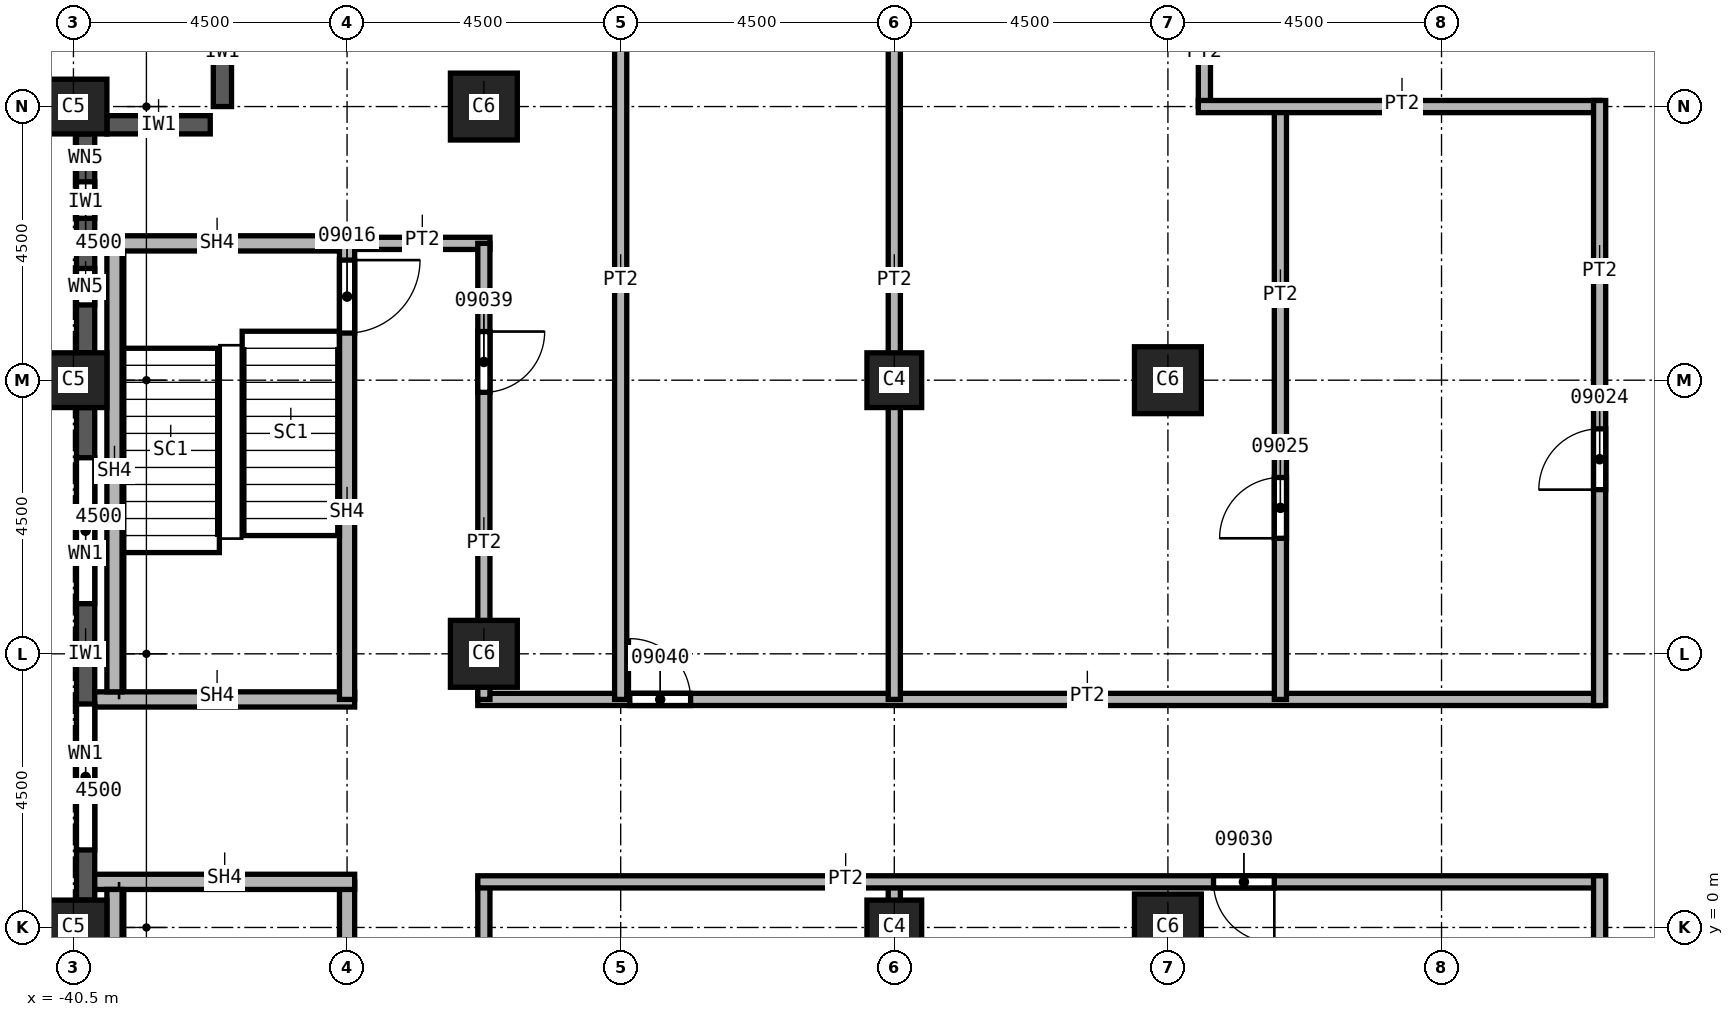
"""IFC4 building model, lengths in metres.
Left out: names, types, materials, properties, quantities, classifications, styles, units other than length and angle.
Written with IfcOpenShell. Run it as: python <this file> out.ifc"""

import sys

from ifc_helpers import new_model, si_unit, direction, frame, frame_2d, origin, origin_2d, place, context, subcontext, project, spatial, rectangle, extrude, element, fill, save


model = new_model("IFC4")
c1 = context("Model", 3, precision=1e-05, world=origin(), true_north=direction((0.0, 1.0)))
c2 = subcontext(c1, "Body", "Model", "MODEL_VIEW")
j1 = project(units=[si_unit("LENGTHUNIT", "METRE"), si_unit("PLANEANGLEUNIT", "RADIAN")], contexts=[c1])
p1 = place(None, origin())
s1 = spatial("IfcSite", under=j1, at=p1, CompositionType="ELEMENT")
p2 = place(p1, origin())
s2 = spatial("IfcBuilding", under=s1, at=p2, CompositionType="ELEMENT")
p3 = place(p2, frame((0.0, 0.0, 162.0)))
s3 = spatial("IfcBuildingStorey", under=s2, at=p3, CompositionType="ELEMENT", Elevation=162.0)
for number, where, z_axis, x_axis in (
    (1, (-40.5, 0.0, 0.0), (0.0, 0.0, 1.0), (0.0, 1.0, 0.0)),
    (2, (-40.5, 9.0, 0.0), (0.0, 0.0, 1.0), (0.0, 1.0, 0.0)),
    (3, (-40.5, 13.5, 0.0), (0.0, 0.0, 1.0), (0.0, 1.0, 0.0)),
):
    element("IfcColumn", number, at=place(p3, frame(where, z_axis=z_axis, x_axis=x_axis)), inside=s3, PredefinedType="COLUMN", context=c2, shape_type="SweptSolid", body=[
        extrude(rectangle(XDim=0.9, YDim=1.1, at=origin_2d()), origin(), (0.0, 0.0, 1.0), 3.7),
    ])
for number, where, z_axis, x_axis in (
    (4, (-33.75, 4.5, 0.0), (0.0, 0.0, 1.0), (1.0, 0.0, 0.0)),
    (5, (-33.75, 13.5, 0.0), (0.0, 0.0, 1.0), (1.0, 0.0, 0.0)),
    (6, (-22.5, 0.0, 0.0), (0.0, 0.0, 1.0), (1.0, 0.0, 0.0)),
    (7, (-22.5, 9.0, 0.0), (0.0, 0.0, 1.0), (1.0, 0.0, 0.0)),
):
    element("IfcColumn", number, at=place(p3, frame(where, z_axis=z_axis, x_axis=x_axis)), inside=s3, PredefinedType="COLUMN", context=c2, shape_type="SweptSolid", body=[
        extrude(rectangle(XDim=1.1, YDim=1.1, at=origin_2d()), origin(), (0.0, 0.0, 1.0), 3.7),
    ])
for number, where, z_axis, x_axis in (
    (8, (-27.0, 0.0, 0.0), (0.0, 0.0, 1.0), (1.0, 0.0, 0.0)),
    (9, (-27.0, 9.0, 0.0), (0.0, 0.0, 1.0), (1.0, 0.0, 0.0)),
):
    element("IfcColumn", number, at=place(p3, frame(where, z_axis=z_axis, x_axis=x_axis)), inside=s3, PredefinedType="COLUMN", context=c2, shape_type="SweptSolid", body=[
        extrude(rectangle(XDim=0.9, YDim=0.9, at=origin_2d()), origin(), (0.0, 0.0, 1.0), 3.7),
    ])
p4 = place(p3, frame((-38.05, 15.3, 0.0), z_axis=(0.0, 0.0, 1.0), x_axis=(0.0, -1.0, 0.0)))
e10 = element("IfcWall", 10, at=p4, inside=s3, PredefinedType="SOLIDWALL", context=c2, shape_type="SweptSolid", body=[
    extrude(rectangle(XDim=1.8, YDim=0.3, at=frame_2d((0.9, 0.0))), origin(), (0.0, 0.0, 1.0), 3.1),
])
p5 = place(p3, frame((-39.95, 13.2, 0.0), z_axis=(0.0, 0.0, 1.0), x_axis=(1.0, 0.0, 0.0)))
e11 = element("IfcWall", 11, at=p5, inside=s3, PredefinedType="SOLIDWALL", context=c2, shape_type="SweptSolid", body=[
    extrude(rectangle(XDim=1.7, YDim=0.3, at=frame_2d((0.85, 0.0))), origin(), (0.0, 0.0, 1.0), 3.1),
])
p6 = place(p3, frame((-40.3, 13.05, 0.0), z_axis=(0.0, 0.0, 1.0), x_axis=(0.0, -1.0, 0.0)))
e12 = element("IfcWall", 12, at=p6, inside=s3, PredefinedType="SOLIDWALL", context=c2, shape_type="SweptSolid", body=[
    extrude(rectangle(XDim=3.6, YDim=0.3, at=frame_2d((1.8, 0.0))), origin(), (0.0, 0.0, 1.0), 3.1),
])
p7 = place(p6, frame((0.788, 0.0, 0.8)))
e13 = element("IfcOpeningElement", 13, at=p7, cuts=e12, PredefinedType="OPENING", context=c2, shape_type="SweptSolid", body=[
    extrude(rectangle(XDim=0.6, YDim=1.95, at=frame_2d((0.3, 0.975))), frame((0.0, 0.15, 0.0), z_axis=(0.0, -1.0, 0.0), x_axis=(1.0, 0.0, 0.0)), (0.0, 0.0, 1.0), 0.3),
])
p8 = place(p6, frame((2.212, 0.0, 0.8)))
e14 = element("IfcOpeningElement", 14, at=p8, cuts=e12, PredefinedType="OPENING", context=c2, shape_type="SweptSolid", body=[
    extrude(rectangle(XDim=0.6, YDim=1.95, at=frame_2d((0.3, 0.975))), frame((0.0, 0.15, 0.0), z_axis=(0.0, -1.0, 0.0), x_axis=(1.0, 0.0, 0.0)), (0.0, 0.0, 1.0), 0.3),
])
p9 = place(p3, frame((-40.3, 8.55, 0.0), z_axis=(0.0, 0.0, 1.0), x_axis=(0.0, -1.0, 0.0)))
e15 = element("IfcWall", 15, at=p9, inside=s3, PredefinedType="SOLIDWALL", context=c2, shape_type="SweptSolid", body=[
    extrude(rectangle(XDim=8.1, YDim=0.3, at=frame_2d((4.05, 0.0))), origin(), (0.0, 0.0, 1.0), 3.1),
])
p10 = place(p9, frame((0.825, 0.0, 0.8)))
e16 = element("IfcOpeningElement", 16, at=p10, cuts=e15, PredefinedType="OPENING", context=c2, shape_type="SweptSolid", body=[
    extrude(rectangle(XDim=2.4, YDim=1.95, at=frame_2d((1.2, 0.975))), frame((0.0, 0.15, 0.0), z_axis=(0.0, -1.0, 0.0), x_axis=(1.0, 0.0, 0.0)), (0.0, 0.0, 1.0), 0.3),
])
p11 = place(p9, frame((4.875, 0.0, 0.8)))
e17 = element("IfcOpeningElement", 17, at=p11, cuts=e15, PredefinedType="OPENING", context=c2, shape_type="SweptSolid", body=[
    extrude(rectangle(XDim=2.4, YDim=1.95, at=frame_2d((1.2, 0.975))), frame((0.0, 0.15, 0.0), z_axis=(0.0, -1.0, 0.0), x_axis=(1.0, 0.0, 0.0)), (0.0, 0.0, 1.0), 0.3),
])
p12 = place(p3, frame((-36.0, 11.25, 0.0), z_axis=(0.0, 0.0, 1.0), x_axis=(1.0, 0.0, 0.0)))
e18 = element("IfcWall", 18, at=p12, inside=s3, PredefinedType="PARTITIONING", context=c2, shape_type="SweptSolid", body=[
    extrude(rectangle(XDim=2.35, YDim=0.2, at=frame_2d((1.175, 0.0))), origin(), (0.0, 0.0, 1.0), 3.7),
])
p13 = place(p3, frame((-33.85, 3.75, 0.0), z_axis=(0.0, 0.0, 1.0), x_axis=(1.0, 0.0, 0.0)))
e19 = element("IfcWall", 19, at=p13, inside=s3, PredefinedType="PARTITIONING", context=c2, shape_type="SweptSolid", body=[
    extrude(rectangle(XDim=18.45, YDim=0.2, at=frame_2d((9.225, 0.0))), origin(), (0.0, 0.0, 1.0), 3.7),
])
p14 = place(p13, frame((2.5, 0.0, 0.0)))
e20 = element("IfcOpeningElement", 20, at=p14, cuts=e19, PredefinedType="OPENING", context=c2, shape_type="SweptSolid", body=[
    extrude(rectangle(XDim=1.0, YDim=2.1, at=frame_2d((0.5, 1.05))), frame((0.0, 0.1, 0.0), z_axis=(0.0, -1.0, 0.0), x_axis=(1.0, 0.0, 0.0)), (0.0, 0.0, 1.0), 0.2),
])
p15 = place(p3, frame((-33.75, 0.75, 0.0), z_axis=(0.0, 0.0, 1.0), x_axis=(0.0, -1.0, 0.0)))
e21 = element("IfcWall", 21, at=p15, inside=s3, PredefinedType="PARTITIONING", context=c2, shape_type="SweptSolid", body=[
    extrude(rectangle(XDim=18.4, YDim=0.2, at=frame_2d((9.2, 0.0))), origin(), (0.0, 0.0, 1.0), 3.7),
])
p16 = place(p15, frame((6.1, 0.0, 0.0)))
e22 = element("IfcOpeningElement", 22, at=p16, cuts=e21, PredefinedType="OPENING", context=c2, shape_type="SweptSolid", body=[
    extrude(rectangle(XDim=1.0, YDim=2.1, at=frame_2d((0.5, 1.05))), frame((0.0, 0.1, 0.0), z_axis=(0.0, -1.0, 0.0), x_axis=(1.0, 0.0, 0.0)), (0.0, 0.0, 1.0), 0.2),
])
p17 = place(p3, frame((-33.75, 11.25, 0.0), z_axis=(0.0, 0.0, 1.0), x_axis=(0.0, -1.0, 0.0)))
e23 = element("IfcWall", 23, at=p17, inside=s3, PredefinedType="PARTITIONING", context=c2, shape_type="SweptSolid", body=[
    extrude(rectangle(XDim=7.5, YDim=0.2, at=frame_2d((3.75, 0.0))), origin(), (0.0, 0.0, 1.0), 3.7),
])
p18 = place(p17, frame((1.45, 0.0, 0.0)))
e24 = element("IfcOpeningElement", 24, at=p18, cuts=e23, PredefinedType="OPENING", context=c2, shape_type="SweptSolid", body=[
    extrude(rectangle(XDim=1.0, YDim=2.1, at=frame_2d((0.5, 1.05))), frame((0.0, 0.1, 0.0), z_axis=(0.0, -1.0, 0.0), x_axis=(1.0, 0.0, 0.0)), (0.0, 0.0, 1.0), 0.2),
])
p19 = place(p3, frame((-31.5, 17.45, 0.0), z_axis=(0.0, 0.0, 1.0), x_axis=(0.0, -1.0, 0.0)))
e25 = element("IfcWall", 25, at=p19, inside=s3, PredefinedType="PARTITIONING", context=c2, shape_type="SweptSolid", body=[
    extrude(rectangle(XDim=13.7, YDim=0.2, at=frame_2d((6.85, 0.0))), origin(), (0.0, 0.0, 1.0), 3.7),
])
p20 = place(p3, frame((-27.0, -17.45, 0.0), z_axis=(0.0, 0.0, 1.0), x_axis=(0.0, 1.0, 0.0)))
e26 = element("IfcWall", 26, at=p20, inside=s3, PredefinedType="PARTITIONING", context=c2, shape_type="SweptSolid", body=[
    extrude(rectangle(XDim=18.2, YDim=0.2, at=frame_2d((9.1, 0.0))), origin(), (0.0, 0.0, 1.0), 3.7),
])
p21 = place(p3, frame((-27.0, 3.75, 0.0), z_axis=(0.0, 0.0, 1.0), x_axis=(0.0, 1.0, 0.0)))
e27 = element("IfcWall", 27, at=p21, inside=s3, PredefinedType="PARTITIONING", context=c2, shape_type="SweptSolid", body=[
    extrude(rectangle(XDim=13.7, YDim=0.2, at=frame_2d((6.85, 0.0))), origin(), (0.0, 0.0, 1.0), 3.7),
])
p22 = place(p3, frame((-15.4, 0.75, 0.0), z_axis=(0.0, 0.0, 1.0), x_axis=(-1.0, 0.0, 0.0)))
e28 = element("IfcWall", 28, at=p22, inside=s3, PredefinedType="PARTITIONING", context=c2, shape_type="SweptSolid", body=[
    extrude(rectangle(XDim=18.45, YDim=0.2, at=frame_2d((9.225, 0.0))), origin(), (0.0, 0.0, 1.0), 3.7),
])
p23 = place(p22, frame((5.35, 0.0, 0.0)))
e29 = element("IfcOpeningElement", 29, at=p23, cuts=e28, PredefinedType="OPENING", context=c2, shape_type="SweptSolid", body=[
    extrude(rectangle(XDim=1.0, YDim=2.1, at=frame_2d((0.5, 1.05))), frame((0.0, 0.1, 0.0), z_axis=(0.0, -1.0, 0.0), x_axis=(1.0, 0.0, 0.0)), (0.0, 0.0, 1.0), 0.2),
])
p24 = place(p3, frame((-21.9, 13.5, 0.0), z_axis=(0.0, 0.0, 1.0), x_axis=(0.0, 1.0, 0.0)))
e30 = element("IfcWall", 30, at=p24, inside=s3, PredefinedType="PARTITIONING", context=c2, shape_type="SweptSolid", body=[
    extrude(rectangle(XDim=1.7, YDim=0.2, at=frame_2d((0.85, 0.0))), origin(), (0.0, 0.0, 1.0), 3.7),
])
p25 = place(p3, frame((-20.65, 3.75, 0.0), z_axis=(0.0, 0.0, 1.0), x_axis=(0.0, 1.0, 0.0)))
e31 = element("IfcWall", 31, at=p25, inside=s3, PredefinedType="PARTITIONING", context=c2, shape_type="SweptSolid", body=[
    extrude(rectangle(XDim=9.75, YDim=0.2, at=frame_2d((4.875, 0.0))), origin(), (0.0, 0.0, 1.0), 3.7),
])
p26 = place(p25, frame((2.65, 0.0, 0.0)))
e32 = element("IfcOpeningElement", 32, at=p26, cuts=e31, PredefinedType="OPENING", context=c2, shape_type="SweptSolid", body=[
    extrude(rectangle(XDim=1.0, YDim=2.1, at=frame_2d((0.5, 1.05))), frame((0.0, 0.1, 0.0), z_axis=(0.0, -1.0, 0.0), x_axis=(1.0, 0.0, 0.0)), (0.0, 0.0, 1.0), 0.2),
])
p27 = place(p3, frame((-15.4, 13.5, 0.0), z_axis=(0.0, 0.0, 1.0), x_axis=(-1.0, 0.0, 0.0)))
e33 = element("IfcWall", 33, at=p27, inside=s3, PredefinedType="PARTITIONING", context=c2, shape_type="SweptSolid", body=[
    extrude(rectangle(XDim=6.6, YDim=0.2, at=frame_2d((3.3, 0.0))), origin(), (0.0, 0.0, 1.0), 3.7),
])
p28 = place(p3, frame((-15.4, -23.25, 0.0), z_axis=(0.0, 0.0, 1.0), x_axis=(0.0, 1.0, 0.0)))
e34 = element("IfcWall", 34, at=p28, inside=s3, PredefinedType="PARTITIONING", context=c2, shape_type="SweptSolid", body=[
    extrude(rectangle(XDim=24.1, YDim=0.2, at=frame_2d((12.05, 0.0))), origin(), (0.0, 0.0, 1.0), 3.7),
])
p29 = place(p28, frame((0.25, 0.0, 0.0)))
e35 = element("IfcOpeningElement", 35, at=p29, cuts=e34, PredefinedType="OPENING", context=c2, shape_type="SweptSolid", body=[
    extrude(rectangle(XDim=1.0, YDim=2.1, at=frame_2d((0.5, 1.05))), frame((0.0, 0.1, 0.0), z_axis=(0.0, -1.0, 0.0), x_axis=(1.0, 0.0, 0.0)), (0.0, 0.0, 1.0), 0.2),
])
p30 = place(p28, frame((8.55, 0.0, 0.0)))
e36 = element("IfcOpeningElement", 36, at=p30, cuts=e34, PredefinedType="OPENING", context=c2, shape_type="SweptSolid", body=[
    extrude(rectangle(XDim=1.0, YDim=2.1, at=frame_2d((0.5, 1.05))), frame((0.0, 0.1, 0.0), z_axis=(0.0, -1.0, 0.0), x_axis=(1.0, 0.0, 0.0)), (0.0, 0.0, 1.0), 0.2),
])
p31 = place(p28, frame((14.4, 0.0, 0.0)))
e37 = element("IfcOpeningElement", 37, at=p31, cuts=e34, PredefinedType="OPENING", context=c2, shape_type="SweptSolid", body=[
    extrude(rectangle(XDim=1.0, YDim=2.1, at=frame_2d((0.5, 1.05))), frame((0.0, 0.1, 0.0), z_axis=(0.0, -1.0, 0.0), x_axis=(1.0, 0.0, 0.0)), (0.0, 0.0, 1.0), 0.2),
])
p32 = place(p3, frame((-15.4, 3.65, 0.0), z_axis=(0.0, 0.0, 1.0), x_axis=(0.0, 1.0, 0.0)))
e38 = element("IfcWall", 38, at=p32, inside=s3, PredefinedType="PARTITIONING", context=c2, shape_type="SweptSolid", body=[
    extrude(rectangle(XDim=9.95, YDim=0.2, at=frame_2d((4.975, 0.0))), origin(), (0.0, 0.0, 1.0), 3.7),
])
p33 = place(p32, frame((3.55, 0.0, 0.0)))
e39 = element("IfcOpeningElement", 39, at=p33, cuts=e38, PredefinedType="OPENING", context=c2, shape_type="SweptSolid", body=[
    extrude(rectangle(XDim=1.0, YDim=2.1, at=frame_2d((0.5, 1.05))), frame((0.0, 0.1, 0.0), z_axis=(0.0, -1.0, 0.0), x_axis=(1.0, 0.0, 0.0)), (0.0, 0.0, 1.0), 0.2),
])
p34 = place(p3, frame((-40.15, 3.75, 0.0), z_axis=(0.0, 0.0, 1.0), x_axis=(1.0, 0.0, 0.0)))
e40 = element("IfcWall", 40, at=p34, inside=s3, PredefinedType="SOLIDWALL", context=c2, shape_type="SweptSolid", body=[
    extrude(rectangle(XDim=4.275, YDim=0.25, at=frame_2d((2.137, 0.0))), origin(), (0.0, 0.0, 1.0), 3.7),
])
p35 = place(p3, frame((-40.15, 11.25, 0.0), z_axis=(0.0, 0.0, 1.0), x_axis=(1.0, 0.0, 0.0)))
e41 = element("IfcWall", 41, at=p35, inside=s3, PredefinedType="SOLIDWALL", context=c2, shape_type="SweptSolid", body=[
    extrude(rectangle(XDim=4.15, YDim=0.25, at=frame_2d((2.075, 0.0))), origin(), (0.0, 0.0, 1.0), 3.7),
])
p36 = place(p3, frame((-36.0, 0.75, 0.0), z_axis=(0.0, 0.0, 1.0), x_axis=(0.0, -1.0, 0.0)))
e42 = element("IfcWall", 42, at=p36, inside=s3, PredefinedType="SOLIDWALL", context=c2, shape_type="SweptSolid", body=[
    extrude(rectangle(XDim=7.625, YDim=0.25, at=frame_2d((3.812, 0.0))), origin(), (0.0, 0.0, 1.0), 3.7),
])
p37 = place(p36, frame((5.95, 0.0, 0.0)))
e43 = element("IfcOpeningElement", 43, at=p37, cuts=e42, PredefinedType="OPENING", context=c2, shape_type="SweptSolid", body=[
    extrude(rectangle(XDim=1.2, YDim=2.1, at=frame_2d((0.6, 1.05))), frame((0.0, 0.125, 0.0), z_axis=(0.0, -1.0, 0.0), x_axis=(1.0, 0.0, 0.0)), (0.0, 0.0, 1.0), 0.25),
])
p38 = place(p3, frame((-36.0, 11.375, 0.0), z_axis=(0.0, 0.0, 1.0), x_axis=(0.0, -1.0, 0.0)))
e44 = element("IfcWall", 44, at=p38, inside=s3, PredefinedType="SOLIDWALL", context=c2, shape_type="SweptSolid", body=[
    extrude(rectangle(XDim=7.625, YDim=0.25, at=frame_2d((3.812, 0.0))), origin(), (0.0, 0.0, 1.0), 3.7),
])
p39 = place(p38, frame((0.4, 0.0, 0.0)))
e45 = element("IfcOpeningElement", 45, at=p39, cuts=e44, PredefinedType="OPENING", context=c2, shape_type="SweptSolid", body=[
    extrude(rectangle(XDim=1.2, YDim=2.1, at=frame_2d((0.6, 1.05))), frame((0.0, 0.125, 0.0), z_axis=(0.0, -1.0, 0.0), x_axis=(1.0, 0.0, 0.0)), (0.0, 0.0, 1.0), 0.25),
])
p40 = place(p3, frame((-35.875, 0.75, 0.0), z_axis=(0.0, 0.0, 1.0), x_axis=(-1.0, 0.0, 0.0)))
e46 = element("IfcWall", 46, at=p40, inside=s3, PredefinedType="SOLIDWALL", context=c2, shape_type="SweptSolid", body=[
    extrude(rectangle(XDim=4.275, YDim=0.25, at=frame_2d((2.137, 0.0))), origin(), (0.0, 0.0, 1.0), 3.7),
])
for number, where, z_axis, x_axis in (
    (47, (-39.825, 3.875, 0.0), (0.0, 0.0, 1.0), (0.0, 1.0, 0.0)),
    (48, (-39.825, -6.625, 0.0), (0.0, 0.0, 1.0), (0.0, 1.0, 0.0)),
):
    element("IfcWall", number, at=place(p3, frame(where, z_axis=z_axis, x_axis=x_axis)), inside=s3, PredefinedType="SOLIDWALL", context=c2, shape_type="SweptSolid", body=[
        extrude(rectangle(XDim=7.25, YDim=0.25, at=frame_2d((3.625, 0.0))), origin(), (0.0, 0.0, 1.0), 3.7),
    ])
p41 = place(p10, origin())
e49 = element("IfcWindow", 49, at=p41, inside=s3, PartitioningType="SINGLE_PANEL", PredefinedType="WINDOW", context=c2, shape_type="SweptSolid", body=[
    extrude(rectangle(XDim=2.4, YDim=1.95, at=frame_2d((1.2, 0.975))), frame((0.0, 0.03, 0.0), z_axis=(0.0, -1.0, 0.0), x_axis=(1.0, 0.0, 0.0)), (0.0, 0.0, 1.0), 0.06),
])
fill(e16, e49)
p42 = place(p11, origin())
e50 = element("IfcWindow", 50, at=p42, inside=s3, PartitioningType="SINGLE_PANEL", PredefinedType="WINDOW", context=c2, shape_type="SweptSolid", body=[
    extrude(rectangle(XDim=2.4, YDim=1.95, at=frame_2d((1.2, 0.975))), frame((0.0, 0.03, 0.0), z_axis=(0.0, -1.0, 0.0), x_axis=(1.0, 0.0, 0.0)), (0.0, 0.0, 1.0), 0.06),
])
fill(e17, e50)
p43 = place(p39, origin())
e51 = element("IfcDoor", 51, at=p43, inside=s3, OperationType="SINGLE_SWING_LEFT", PredefinedType="DOOR", context=c2, shape_type="SweptSolid", body=[
    extrude(rectangle(XDim=1.2, YDim=2.1, at=frame_2d((0.6, 1.05))), frame((0.0, 0.025, 0.0), z_axis=(0.0, -1.0, 0.0), x_axis=(1.0, 0.0, 0.0)), (0.0, 0.0, 1.0), 0.05),
])
fill(e45, e51)
p44 = place(p33, origin())
e52 = element("IfcDoor", 52, at=p44, inside=s3, OperationType="SINGLE_SWING_LEFT", PredefinedType="DOOR", context=c2, shape_type="SweptSolid", body=[
    extrude(rectangle(XDim=1.0, YDim=2.1, at=frame_2d((0.5, 1.05))), frame((0.0, 0.025, 0.0), z_axis=(0.0, -1.0, 0.0), x_axis=(1.0, 0.0, 0.0)), (0.0, 0.0, 1.0), 0.05),
])
fill(e39, e52)
p45 = place(p26, origin())
e53 = element("IfcDoor", 53, at=p45, inside=s3, OperationType="SINGLE_SWING_RIGHT", PredefinedType="DOOR", context=c2, shape_type="SweptSolid", body=[
    extrude(rectangle(XDim=1.0, YDim=2.1, at=frame_2d((0.5, 1.05))), frame((0.0, 0.025, 0.0), z_axis=(0.0, -1.0, 0.0), x_axis=(1.0, 0.0, 0.0)), (0.0, 0.0, 1.0), 0.05),
])
fill(e32, e53)
p46 = place(p23, origin())
e54 = element("IfcDoor", 54, at=p46, inside=s3, OperationType="SINGLE_SWING_LEFT", PredefinedType="DOOR", context=c2, shape_type="SweptSolid", body=[
    extrude(rectangle(XDim=1.0, YDim=2.1, at=frame_2d((0.5, 1.05))), frame((0.0, 0.025, 0.0), z_axis=(0.0, -1.0, 0.0), x_axis=(1.0, 0.0, 0.0)), (0.0, 0.0, 1.0), 0.05),
])
fill(e29, e54)
p47 = place(p18, origin())
e55 = element("IfcDoor", 55, at=p47, inside=s3, OperationType="SINGLE_SWING_RIGHT", PredefinedType="DOOR", context=c2, shape_type="SweptSolid", body=[
    extrude(rectangle(XDim=1.0, YDim=2.1, at=frame_2d((0.5, 1.05))), frame((0.0, 0.025, 0.0), z_axis=(0.0, -1.0, 0.0), x_axis=(1.0, 0.0, 0.0)), (0.0, 0.0, 1.0), 0.05),
])
fill(e24, e55)
p48 = place(p14, origin())
e56 = element("IfcDoor", 56, at=p48, inside=s3, OperationType="SINGLE_SWING_LEFT", PredefinedType="DOOR", context=c2, shape_type="SweptSolid", body=[
    extrude(rectangle(XDim=1.0, YDim=2.1, at=frame_2d((0.5, 1.05))), frame((0.0, 0.025, 0.0), z_axis=(0.0, -1.0, 0.0), x_axis=(1.0, 0.0, 0.0)), (0.0, 0.0, 1.0), 0.05),
])
fill(e20, e56)
p49 = place(p7, origin())
e57 = element("IfcWindow", 57, at=p49, inside=s3, PartitioningType="SINGLE_PANEL", PredefinedType="WINDOW", context=c2, shape_type="SweptSolid", body=[
    extrude(rectangle(XDim=0.6, YDim=1.95, at=frame_2d((0.3, 0.975))), frame((0.0, 0.03, 0.0), z_axis=(0.0, -1.0, 0.0), x_axis=(1.0, 0.0, 0.0)), (0.0, 0.0, 1.0), 0.06),
])
fill(e13, e57)
p50 = place(p8, origin())
e58 = element("IfcWindow", 58, at=p50, inside=s3, PartitioningType="SINGLE_PANEL", PredefinedType="WINDOW", context=c2, shape_type="SweptSolid", body=[
    extrude(rectangle(XDim=0.6, YDim=1.95, at=frame_2d((0.3, 0.975))), frame((0.0, 0.03, 0.0), z_axis=(0.0, -1.0, 0.0), x_axis=(1.0, 0.0, 0.0)), (0.0, 0.0, 1.0), 0.06),
])
fill(e14, e58)
save(model, sys.argv[1])
